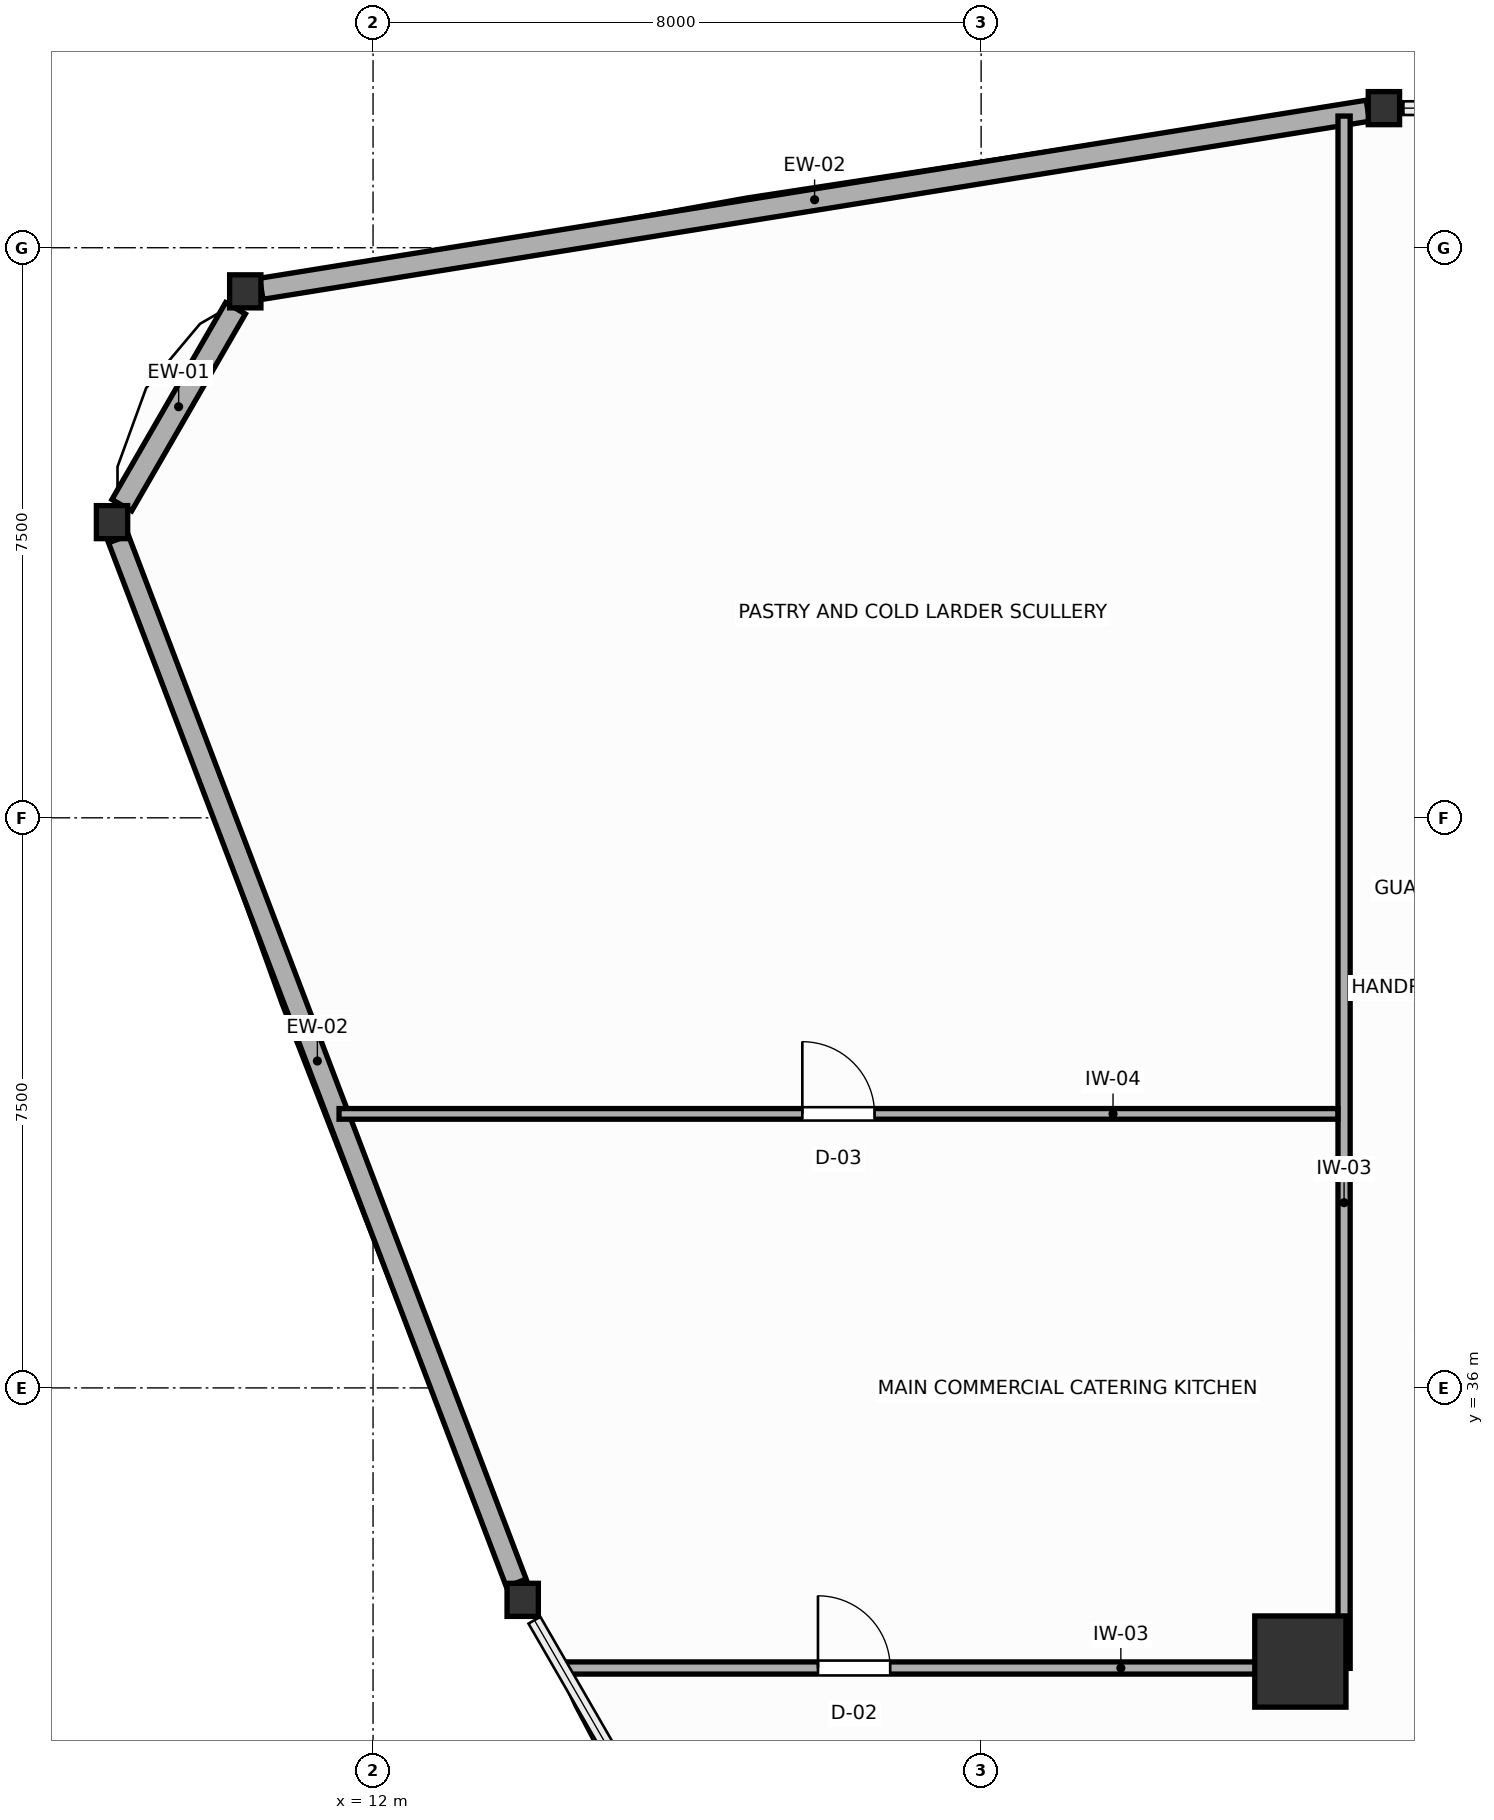
"""IFC4 building model, lengths in metres.
Left out: names, types, materials, properties, quantities, classifications, styles, units other than length and angle.
Written with IfcOpenShell. Run it as: python <this file> out.ifc"""

import sys

from ifc_helpers import new_model, si_unit, direction, frame, frame_2d, origin, origin_2d, place, context, subcontext, project, spatial, rectangle, i_section, extrude, source, transform, mapped, element, fill, save


model = new_model("IFC4")
c1 = context("Model", 3, precision=1e-05, world=origin(), true_north=direction((0.0, 1.0)))
c2 = subcontext(c1, "Body", "Model", "MODEL_VIEW")
j1 = project(units=[si_unit("LENGTHUNIT", "METRE"), si_unit("PLANEANGLEUNIT", "RADIAN")], contexts=[c1])
p1 = place(None, origin())
s1 = spatial("IfcSite", under=j1, at=p1, CompositionType="ELEMENT")
p2 = place(p1, origin())
s2 = spatial("IfcBuilding", under=s1, at=p2, CompositionType="ELEMENT")
p3 = place(p2, frame((0.0, 0.0, 154.2)))
s3 = spatial("IfcBuildingStorey", under=s2, at=p3, CompositionType="ELEMENT", Elevation=154.2)
m1 = source(origin(), c2, "Body", "SweptSolid", [
    extrude(rectangle(XDim=1.2, YDim=1.2, at=origin_2d()), origin(), (0.0, 0.0, 1.0), 3.6),
])
p4 = place(p3, frame((24.2, 32.4, 0.0), z_axis=(0.0, 0.0, 1.0), x_axis=(1.0, 0.0, 0.0)))
e1 = element("IfcColumn", 1, at=p4, inside=s3, PredefinedType="COLUMN", context=c2, shape_type="MappedRepresentation", body=[
    mapped(m1, transform((0.0, 0.0, 0.0), scale=1.0)),
])
m2 = source(origin(), c2, "Body", "SweptSolid", [
    extrude(i_section(OverallWidth=0.412, OverallDepth=0.435, WebThickness=0.033, FlangeThickness=0.053, FilletRadius=0.015, at=origin_2d()), origin(), (0.0, 0.0, 1.0), 3.6),
])
for number, where, z_axis, x_axis in (
    (2, (25.299, 52.836, 0.0), (0.0, 0.0, 1.0), (1.0, 0.0, 0.0)),
    (3, (10.319, 50.426, 0.0), (0.0, 0.0, 1.0), (1.0, 0.0, 0.0)),
    (4, (8.566, 47.39, 0.0), (0.0, 0.0, 1.0), (1.0, 0.0, 0.0)),
    (5, (13.969, 33.212, 0.0), (0.0, 0.0, 1.0), (1.0, 0.0, 0.0)),
):
    element("IfcColumn", number, at=place(p3, frame(where, z_axis=z_axis, x_axis=x_axis)), inside=s3, PredefinedType="COLUMN", context=c2, shape_type="MappedRepresentation", body=[
        mapped(m2, transform((0.0, 0.0, 0.0), scale=1.0)),
    ])
p5 = place(p3, frame((25.088, 52.802, 0.0), z_axis=(0.0, 0.0, 1.0), x_axis=(-0.987303259595, -0.158846698404, 0.0)))
e6 = element("IfcWall", 6, at=p5, inside=s3, PredefinedType="SOLIDWALL", context=c2, shape_type="SweptSolid", body=[
    extrude(rectangle(XDim=14.746, YDim=0.28, at=frame_2d((7.373, 0.0))), origin(), (0.0, 0.0, 1.0), 1.87),
])
p6 = place(p3, frame((10.19, 50.204, 0.0), z_axis=(0.0, 0.0, 1.0), x_axis=(-0.499974392705, -0.866040187658, 0.0)))
e7 = element("IfcWall", 7, at=p6, inside=s3, PredefinedType="SOLIDWALL", context=c2, shape_type="SweptSolid", body=[
    extrude(rectangle(XDim=2.992, YDim=0.3, at=frame_2d((1.496, 0.0))), origin(), (0.0, 0.0, 1.0), 1.87),
])
p7 = place(p3, frame((8.651, 47.167, 0.0), z_axis=(0.0, 0.0, 1.0), x_axis=(0.356077530784, -0.934456415287, 0.0)))
e8 = element("IfcWall", 8, at=p7, inside=s3, PredefinedType="SOLIDWALL", context=c2, shape_type="SweptSolid", body=[
    extrude(rectangle(XDim=14.697, YDim=0.28, at=frame_2d((7.348, 0.0))), origin(), (0.0, 0.0, 1.0), 1.87),
])
p8 = place(p3, frame((24.775, 32.31, 0.0), z_axis=(0.0, 0.0, 1.0), x_axis=(0.0, 1.0, 0.0)))
e9 = element("IfcWall", 9, at=p8, inside=s3, PredefinedType="PARTITIONING", context=c2, shape_type="SweptSolid", body=[
    extrude(rectangle(XDim=20.422, YDim=0.16, at=frame_2d((10.211, 0.0))), origin(), (0.0, 0.0, 1.0), 3.4),
])
p9 = place(p3, frame((14.507, 32.315, 0.0), z_axis=(0.0, 0.0, 1.0), x_axis=(1.0, 0.0, 0.0)))
e10 = element("IfcWall", 10, at=p9, inside=s3, PredefinedType="PARTITIONING", context=c2, shape_type="SweptSolid", body=[
    extrude(rectangle(XDim=10.187, YDim=0.16, at=frame_2d((5.093, 0.0))), origin(), (0.0, 0.0, 1.0), 2.16),
])
p10 = place(p9, frame((3.347, 0.0, 0.0)))
e11 = element("IfcOpeningElement", 11, at=p10, cuts=e10, PredefinedType="OPENING", context=c2, shape_type="SweptSolid", body=[
    extrude(rectangle(XDim=0.95, YDim=2.05, at=frame_2d((0.475, 1.025))), frame((0.0, 0.09, 0.0), z_axis=(0.0, -1.0, 0.0), x_axis=(1.0, 0.0, 0.0)), (0.0, 0.0, 1.0), 0.18),
])
p11 = place(p3, frame((11.552, 39.605, 0.0), z_axis=(0.0, 0.0, 1.0), x_axis=(1.0, 0.0, 0.0)))
e12 = element("IfcWall", 12, at=p11, inside=s3, PredefinedType="PARTITIONING", context=c2, shape_type="SweptSolid", body=[
    extrude(rectangle(XDim=13.141, YDim=0.14, at=frame_2d((6.57, 0.0))), origin(), (0.0, 0.0, 1.0), 3.4),
])
p12 = place(p11, frame((6.095, 0.0, 0.0)))
e13 = element("IfcOpeningElement", 13, at=p12, cuts=e12, PredefinedType="OPENING", context=c2, shape_type="SweptSolid", body=[
    extrude(rectangle(XDim=0.95, YDim=2.05, at=frame_2d((0.475, 1.025))), frame((0.0, 0.08, 0.0), z_axis=(0.0, -1.0, 0.0), x_axis=(1.0, 0.0, 0.0)), (0.0, 0.0, 1.0), 0.16),
])
p13 = place(p10, origin())
e14 = element("IfcDoor", 14, at=p13, inside=s3, OperationType="SINGLE_SWING_LEFT", PredefinedType="DOOR", context=c2, shape_type="SweptSolid", body=[
    extrude(rectangle(XDim=0.95, YDim=2.05, at=frame_2d((0.475, 1.025))), frame((0.0, 0.025, 0.0), z_axis=(0.0, -1.0, 0.0), x_axis=(1.0, 0.0, 0.0)), (0.0, 0.0, 1.0), 0.05),
])
fill(e11, e14)
p14 = place(p12, origin())
e15 = element("IfcDoor", 15, at=p14, inside=s3, OperationType="SINGLE_SWING_LEFT", PredefinedType="DOOR", context=c2, shape_type="SweptSolid", body=[
    extrude(rectangle(XDim=0.95, YDim=2.05, at=frame_2d((0.475, 1.025))), frame((0.0, 0.025, 0.0), z_axis=(0.0, -1.0, 0.0), x_axis=(1.0, 0.0, 0.0)), (0.0, 0.0, 1.0), 0.05),
])
fill(e13, e15)
save(model, sys.argv[1])
